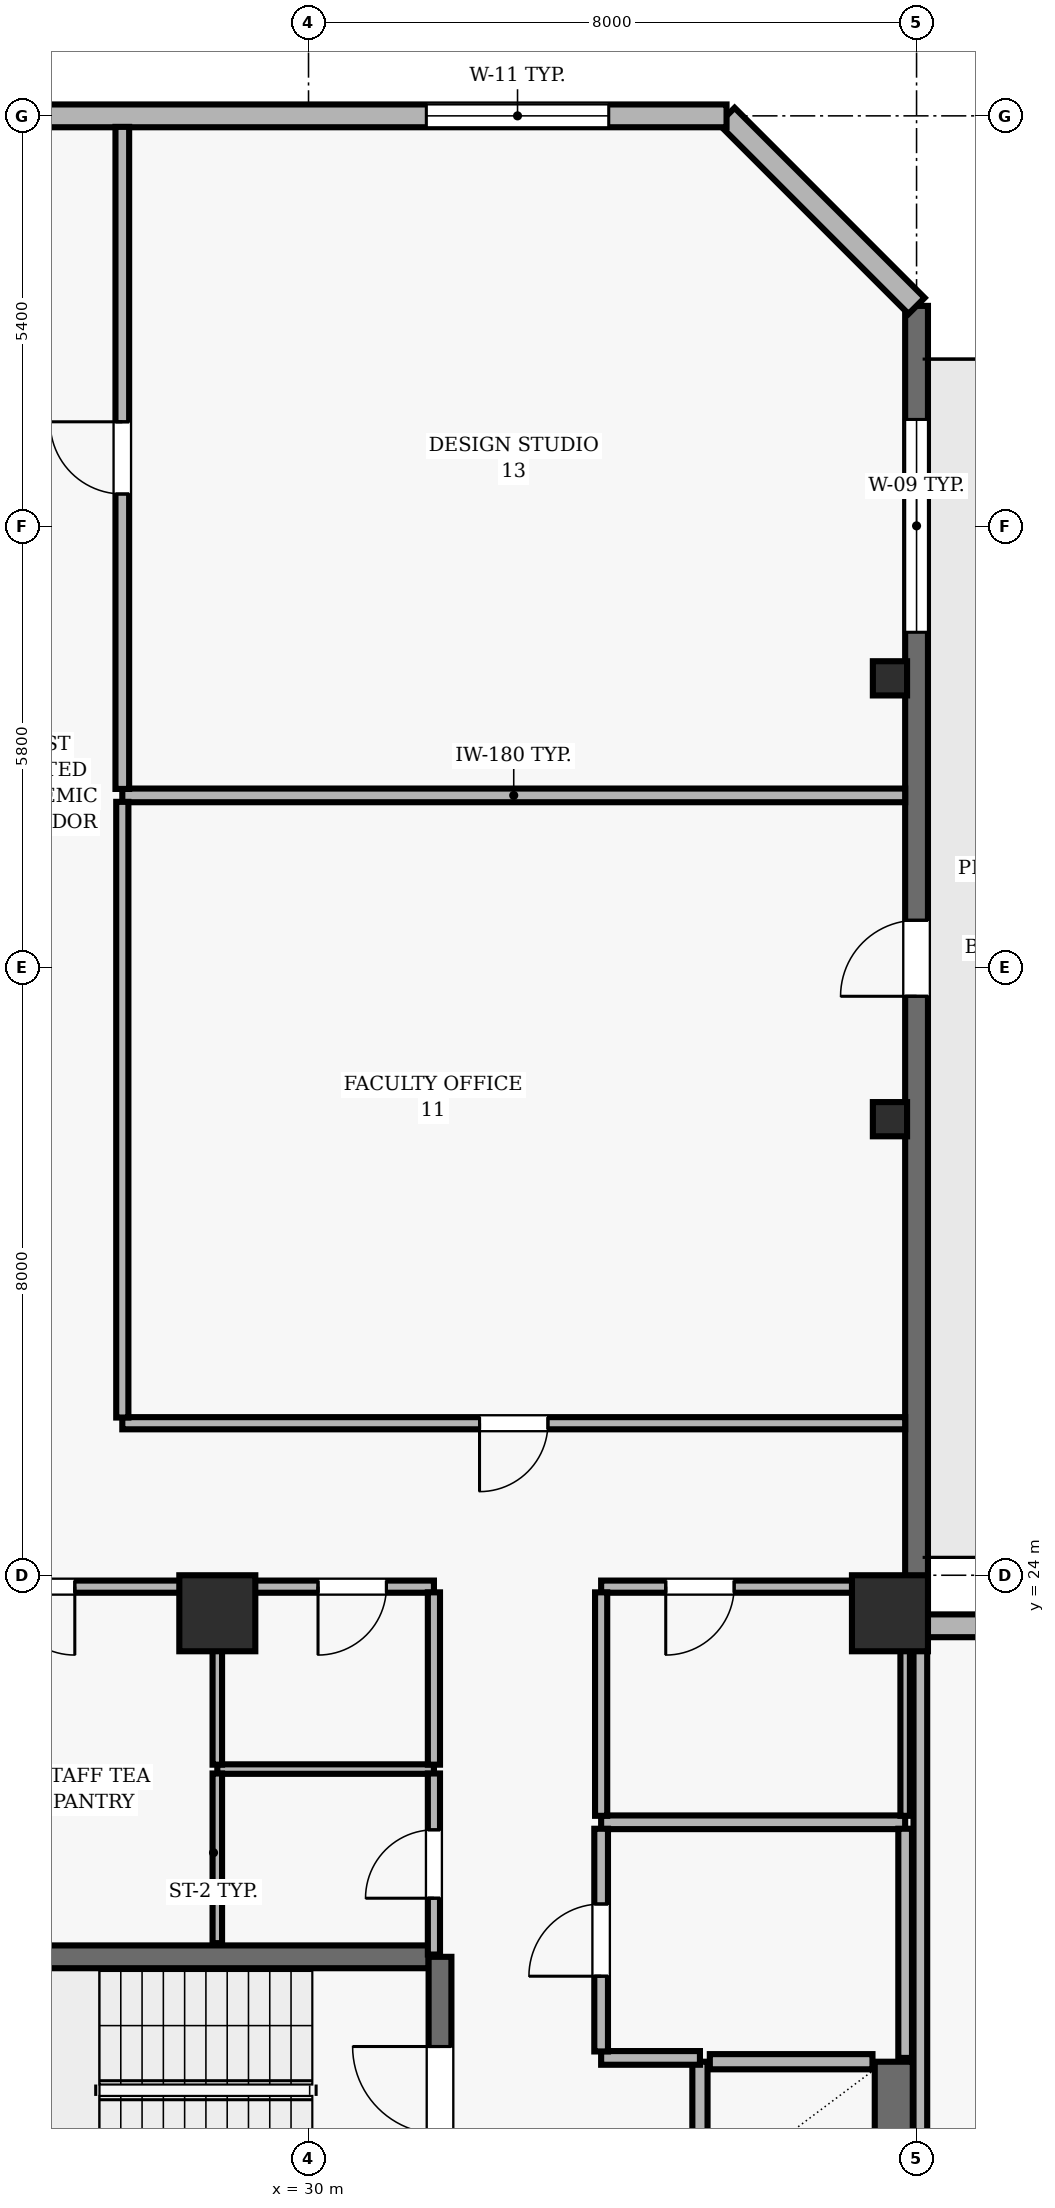
"""IFC4 building model, lengths in metres.
Left out: names, types, materials, properties, quantities, classifications, styles, units other than length and angle.
Written with IfcOpenShell. Run it as: python <this file> out.ifc"""

import sys

from ifc_helpers import new_model, si_unit, direction, frame, frame_2d, origin, origin_2d, place, context, subcontext, project, spatial, rectangle, hollow_rectangle, extrude, element, fill, save


model = new_model("IFC4")
c1 = context("Model", 3, precision=1e-05, world=origin(), true_north=direction((0.0, 1.0)))
c2 = subcontext(c1, "Body", "Model", "MODEL_VIEW")
j1 = project(units=[si_unit("LENGTHUNIT", "METRE"), si_unit("PLANEANGLEUNIT", "RADIAN")], contexts=[c1])
p1 = place(None, origin())
s1 = spatial("IfcSite", under=j1, at=p1, CompositionType="ELEMENT")
p2 = place(p1, origin())
s2 = spatial("IfcBuilding", under=s1, at=p2, CompositionType="ELEMENT")
p3 = place(p2, frame((0.0, 0.0, 199.2)))
s3 = spatial("IfcBuildingStorey", under=s2, at=p3, CompositionType="ELEMENT", Elevation=199.2)
for number, where, z_axis, x_axis in (
    (1, (28.8, 23.5, 0.0), (0.0, 0.0, 1.0), (1.0, 0.0, 0.0)),
    (2, (37.65, 23.5, 0.0), (0.0, 0.0, 1.0), (1.0, 0.0, 0.0)),
):
    element("IfcColumn", number, at=place(p3, frame(where, z_axis=z_axis, x_axis=x_axis)), inside=s3, PredefinedType="COLUMN", context=c2, shape_type="SweptSolid", body=[
        extrude(rectangle(XDim=1.0, YDim=1.0, at=origin_2d()), origin(), (0.0, 0.0, 1.0), 3.9),
    ])
for number, where, z_axis, x_axis in (
    (3, (37.65, 30.0, 0.0), (0.0, 0.0, 1.0), (1.0, 0.0, 0.0)),
    (4, (37.65, 35.8, 0.0), (0.0, 0.0, 1.0), (1.0, 0.0, 0.0)),
):
    element("IfcColumn", number, at=place(p3, frame(where, z_axis=z_axis, x_axis=x_axis)), inside=s3, PredefinedType="COLUMN", context=c2, shape_type="SweptSolid", body=[
        extrude(hollow_rectangle(XDim=0.45, YDim=0.45, WallThickness=0.02, at=origin_2d()), origin(), (0.0, 0.0, 1.0), 3.9),
    ])
p4 = place(p3, frame((45.9, 23.335, 0.0), z_axis=(0.0, 0.0, 1.0), x_axis=(-1.0, 0.0, 0.0)))
e5 = element("IfcWall", 5, at=p4, inside=s3, PredefinedType="SOLIDWALL", context=c2, shape_type="SweptSolid", body=[
    extrude(rectangle(XDim=7.9, YDim=0.3, at=frame_2d((3.95, 0.0))), origin(), (0.0, 0.0, 1.0), 3.69),
])
p5 = place(p4, frame((2.75, 0.0, 0.9)))
e6 = element("IfcOpeningElement", 6, at=p5, cuts=e5, PredefinedType="OPENING", context=c2, shape_type="SweptSolid", body=[
    extrude(rectangle(XDim=2.4, YDim=1.8, at=frame_2d((1.2, 0.9))), frame((0.0, 0.16, 0.0), z_axis=(0.0, -1.0, 0.0), x_axis=(1.0, 0.0, 0.0)), (0.0, 0.0, 1.0), 0.32),
])
p6 = place(p3, frame((38.0, 23.335, 0.0), z_axis=(0.0, 0.0, 1.0), x_axis=(0.0, 1.0, 0.0)))
e7 = element("IfcWall", 7, at=p6, inside=s3, PredefinedType="SOLIDWALL", context=c2, shape_type="SweptSolid", body=[
    extrude(rectangle(XDim=17.365, YDim=0.3, at=frame_2d((8.683, 0.0))), origin(), (0.0, 0.0, 1.0), 3.69),
])
p7 = place(p6, frame((8.282, 0.0, 0.0)))
e8 = element("IfcOpeningElement", 8, at=p7, cuts=e7, PredefinedType="OPENING", context=c2, shape_type="SweptSolid", body=[
    extrude(rectangle(XDim=1.0, YDim=2.2, at=frame_2d((0.5, 1.1))), frame((0.0, 0.16, 0.0), z_axis=(0.0, -1.0, 0.0), x_axis=(1.0, 0.0, 0.0)), (0.0, 0.0, 1.0), 0.32),
])
p8 = place(p6, frame((13.071, 0.0, 0.9)))
e9 = element("IfcOpeningElement", 9, at=p8, cuts=e7, PredefinedType="OPENING", context=c2, shape_type="SweptSolid", body=[
    extrude(rectangle(XDim=2.8, YDim=1.8, at=frame_2d((1.4, 0.9))), frame((0.0, 0.16, 0.0), z_axis=(0.0, -1.0, 0.0), x_axis=(1.0, 0.0, 0.0)), (0.0, 0.0, 1.0), 0.32),
])
p9 = place(p3, frame((38.0, 40.7, 0.0), z_axis=(0.0, 0.0, 1.0), x_axis=(-0.707106781187, 0.707106781187, 0.0)))
e10 = element("IfcWall", 10, at=p9, inside=s3, PredefinedType="SOLIDWALL", context=c2, shape_type="SweptSolid", body=[
    extrude(rectangle(XDim=3.536, YDim=0.3, at=frame_2d((1.768, 0.0))), origin(), (0.0, 0.0, 1.0), 3.69),
])
p10 = place(p3, frame((35.5, 43.2, 0.0), z_axis=(0.0, 0.0, 1.0), x_axis=(-1.0, 0.0, 0.0)))
e11 = element("IfcWall", 11, at=p10, inside=s3, PredefinedType="SOLIDWALL", context=c2, shape_type="SweptSolid", body=[
    extrude(rectangle(XDim=11.0, YDim=0.3, at=frame_2d((5.5, 0.0))), origin(), (0.0, 0.0, 1.0), 3.69),
])
p11 = place(p10, frame((1.55, 0.0, 0.9)))
e12 = element("IfcOpeningElement", 12, at=p11, cuts=e11, PredefinedType="OPENING", context=c2, shape_type="SweptSolid", body=[
    extrude(rectangle(XDim=2.4, YDim=2.2, at=frame_2d((1.2, 1.1))), frame((0.0, 0.16, 0.0), z_axis=(0.0, -1.0, 0.0), x_axis=(1.0, 0.0, 0.0)), (0.0, 0.0, 1.0), 0.32),
])
p12 = place(p3, frame((31.58, 18.98, 0.0), z_axis=(0.0, 0.0, 1.0), x_axis=(-1.0, 0.0, 0.0)))
e13 = element("IfcWall", 13, at=p12, inside=s3, PredefinedType="SHEAR", context=c2, shape_type="SweptSolid", body=[
    extrude(rectangle(XDim=8.36, YDim=0.3, at=frame_2d((4.18, 0.0))), origin(), (0.0, 0.0, 1.0), 3.69),
])
p13 = place(p3, frame((31.73, 15.47, 0.0), z_axis=(0.0, 0.0, 1.0), x_axis=(0.0, 1.0, 0.0)))
e14 = element("IfcWall", 14, at=p13, inside=s3, PredefinedType="SHEAR", context=c2, shape_type="SweptSolid", body=[
    extrude(rectangle(XDim=3.51, YDim=0.3, at=frame_2d((1.755, 0.0))), origin(), (0.0, 0.0, 1.0), 3.69),
])
p14 = place(p13, frame((1.18, 0.0, 0.0)))
e15 = element("IfcOpeningElement", 15, at=p14, cuts=e14, PredefinedType="OPENING", context=c2, shape_type="SweptSolid", body=[
    extrude(rectangle(XDim=1.15, YDim=2.15, at=frame_2d((0.575, 1.075))), frame((0.0, 0.16, 0.0), z_axis=(0.0, -1.0, 0.0), x_axis=(1.0, 0.0, 0.0)), (0.0, 0.0, 1.0), 0.32),
])
p15 = place(p3, frame((35.15, 17.6, 0.0), z_axis=(0.0, 0.0, 1.0), x_axis=(0.0, -1.0, 0.0)))
e16 = element("IfcWall", 16, at=p15, inside=s3, PredefinedType="SOLIDWALL", context=c2, shape_type="SweptSolid", body=[
    extrude(rectangle(XDim=1.85, YDim=0.2, at=frame_2d((0.925, 0.0))), origin(), (0.0, 0.0, 1.0), 3.69),
])
p16 = place(p3, frame((37.7, 15.75, 0.0), z_axis=(0.0, 0.0, 1.0), x_axis=(0.0, 1.0, 0.0)))
e17 = element("IfcWall", 17, at=p16, inside=s3, PredefinedType="SHEAR", context=c2, shape_type="SweptSolid", body=[
    extrude(rectangle(XDim=1.85, YDim=0.5, at=frame_2d((0.925, 0.0))), origin(), (0.0, 0.0, 1.0), 3.69),
])
p17 = place(p3, frame((37.42, 17.6, 0.0), z_axis=(0.0, 0.0, 1.0), x_axis=(-1.0, 0.0, 0.0)))
e18 = element("IfcWall", 18, at=p17, inside=s3, PredefinedType="SOLIDWALL", context=c2, shape_type="SweptSolid", body=[
    extrude(rectangle(XDim=2.14, YDim=0.2, at=frame_2d((1.07, 0.0))), origin(), (0.0, 0.0, 1.0), 3.69),
])
p18 = place(p3, frame((28.8, 23.85, 0.0), z_axis=(0.0, 0.0, 1.0), x_axis=(-1.0, 0.0, 0.0)))
e19 = element("IfcWall", 19, at=p18, inside=s3, PredefinedType="PARTITIONING", context=c2, shape_type="SweptSolid", body=[
    extrude(rectangle(XDim=3.25, YDim=0.16, at=frame_2d((1.625, 0.0))), origin(), (0.0, 0.0, 1.0), 3.139),
])
p19 = place(p18, frame((1.875, 0.0, 0.0)))
e20 = element("IfcOpeningElement", 20, at=p19, cuts=e19, PredefinedType="OPENING", context=c2, shape_type="SweptSolid", body=[
    extrude(rectangle(XDim=0.9, YDim=2.1, at=frame_2d((0.45, 1.05))), frame((0.0, 0.09, 0.0), z_axis=(0.0, -1.0, 0.0), x_axis=(1.0, 0.0, 0.0)), (0.0, 0.0, 1.0), 0.18),
])
p20 = place(p3, frame((31.65, 21.45, 0.0), z_axis=(0.0, 0.0, 1.0), x_axis=(-1.0, 0.0, 0.0)))
e21 = element("IfcWall", 21, at=p20, inside=s3, PredefinedType="PARTITIONING", context=c2, shape_type="SweptSolid", body=[
    extrude(rectangle(XDim=2.85, YDim=0.125, at=frame_2d((1.425, 0.0))), origin(), (0.0, 0.0, 1.0), 3.69),
])
p21 = place(p3, frame((31.65, 23.85, 0.0), z_axis=(0.0, 0.0, 1.0), x_axis=(-1.0, 0.0, 0.0)))
e22 = element("IfcWall", 22, at=p21, inside=s3, PredefinedType="PARTITIONING", context=c2, shape_type="SweptSolid", body=[
    extrude(rectangle(XDim=2.85, YDim=0.16, at=frame_2d((1.425, 0.0))), origin(), (0.0, 0.0, 1.0), 3.139),
])
p22 = place(p21, frame((0.625, 0.0, 0.0)))
e23 = element("IfcOpeningElement", 23, at=p22, cuts=e22, PredefinedType="OPENING", context=c2, shape_type="SweptSolid", body=[
    extrude(rectangle(XDim=0.9, YDim=2.1, at=frame_2d((0.45, 1.05))), frame((0.0, 0.09, 0.0), z_axis=(0.0, -1.0, 0.0), x_axis=(1.0, 0.0, 0.0)), (0.0, 0.0, 1.0), 0.18),
])
p23 = place(p3, frame((33.85, 17.65, 0.0), z_axis=(0.0, 0.0, 1.0), x_axis=(1.0, 0.0, 0.0)))
e24 = element("IfcWall", 24, at=p23, inside=s3, PredefinedType="PARTITIONING", context=c2, shape_type="SweptSolid", body=[
    extrude(rectangle(XDim=1.3, YDim=0.18, at=frame_2d((0.65, 0.0))), origin(), (0.0, 0.0, 1.0), 3.69),
])
p24 = place(p3, frame((37.85, 20.75, 0.0), z_axis=(0.0, 0.0, 1.0), x_axis=(-1.0, 0.0, 0.0)))
e25 = element("IfcWall", 25, at=p24, inside=s3, PredefinedType="PARTITIONING", context=c2, shape_type="SweptSolid", body=[
    extrude(rectangle(XDim=4.0, YDim=0.18, at=frame_2d((2.0, 0.0))), origin(), (0.0, 0.0, 1.0), 3.69),
])
p25 = place(p3, frame((37.85, 23.85, 0.0), z_axis=(0.0, 0.0, 1.0), x_axis=(-1.0, 0.0, 0.0)))
e26 = element("IfcWall", 26, at=p25, inside=s3, PredefinedType="PARTITIONING", context=c2, shape_type="SweptSolid", body=[
    extrude(rectangle(XDim=4.0, YDim=0.16, at=frame_2d((2.0, 0.0))), origin(), (0.0, 0.0, 1.0), 3.139),
])
p26 = place(p25, frame((2.25, 0.0, 0.0)))
e27 = element("IfcOpeningElement", 27, at=p26, cuts=e26, PredefinedType="OPENING", context=c2, shape_type="SweptSolid", body=[
    extrude(rectangle(XDim=0.9, YDim=2.1, at=frame_2d((0.45, 1.05))), frame((0.0, 0.09, 0.0), z_axis=(0.0, -1.0, 0.0), x_axis=(1.0, 0.0, 0.0)), (0.0, 0.0, 1.0), 0.18),
])
p27 = place(p3, frame((37.85, 26.0, 0.0), z_axis=(0.0, 0.0, 1.0), x_axis=(-1.0, 0.0, 0.0)))
e28 = element("IfcWall", 28, at=p27, inside=s3, PredefinedType="PARTITIONING", context=c2, shape_type="SweptSolid", body=[
    extrude(rectangle(XDim=10.3, YDim=0.16, at=frame_2d((5.15, 0.0))), origin(), (0.0, 0.0, 1.0), 3.69),
])
p28 = place(p27, frame((4.7, 0.0, 0.0)))
e29 = element("IfcOpeningElement", 29, at=p28, cuts=e28, PredefinedType="OPENING", context=c2, shape_type="SweptSolid", body=[
    extrude(rectangle(XDim=0.9, YDim=2.1, at=frame_2d((0.45, 1.05))), frame((0.0, 0.09, 0.0), z_axis=(0.0, -1.0, 0.0), x_axis=(1.0, 0.0, 0.0)), (0.0, 0.0, 1.0), 0.18),
])
p29 = place(p3, frame((37.85, 34.26, 0.0), z_axis=(0.0, 0.0, 1.0), x_axis=(-1.0, 0.0, 0.0)))
e30 = element("IfcWall", 30, at=p29, inside=s3, PredefinedType="PARTITIONING", context=c2, shape_type="SweptSolid", body=[
    extrude(rectangle(XDim=10.3, YDim=0.18, at=frame_2d((5.15, 0.0))), origin(), (0.0, 0.0, 1.0), 3.69),
])
p30 = place(p3, frame((27.55, 26.075, 0.0), z_axis=(0.0, 0.0, 1.0), x_axis=(0.0, 1.0, 0.0)))
e31 = element("IfcWall", 31, at=p30, inside=s3, PredefinedType="PARTITIONING", context=c2, shape_type="SweptSolid", body=[
    extrude(rectangle(XDim=8.1, YDim=0.16, at=frame_2d((4.05, 0.0))), origin(), (0.0, 0.0, 1.0), 3.69),
])
p31 = place(p3, frame((27.55, 34.345, 0.0), z_axis=(0.0, 0.0, 1.0), x_axis=(0.0, 1.0, 0.0)))
e32 = element("IfcWall", 32, at=p31, inside=s3, PredefinedType="PARTITIONING", context=c2, shape_type="SweptSolid", body=[
    extrude(rectangle(XDim=8.71, YDim=0.18, at=frame_2d((4.355, 0.0))), origin(), (0.0, 0.0, 1.0), 3.69),
])
p32 = place(p31, frame((3.88, 0.0, 0.0)))
e33 = element("IfcOpeningElement", 33, at=p32, cuts=e32, PredefinedType="OPENING", context=c2, shape_type="SweptSolid", body=[
    extrude(rectangle(XDim=0.95, YDim=2.1, at=frame_2d((0.475, 1.05))), frame((0.0, 0.1, 0.0), z_axis=(0.0, -1.0, 0.0), x_axis=(1.0, 0.0, 0.0)), (0.0, 0.0, 1.0), 0.2),
])
p33 = place(p3, frame((28.8, 21.392, 0.0), z_axis=(0.0, 0.0, 1.0), x_axis=(0.0, -1.0, 0.0)))
e34 = element("IfcWall", 34, at=p33, inside=s3, PredefinedType="PARTITIONING", context=c2, shape_type="SweptSolid", body=[
    extrude(rectangle(XDim=2.232, YDim=0.125, at=frame_2d((1.116, 0.0))), origin(), (0.0, 0.0, 1.0), 3.69),
])
p34 = place(p3, frame((28.8, 23.775, 0.0), z_axis=(0.0, 0.0, 1.0), x_axis=(0.0, -1.0, 0.0)))
e35 = element("IfcWall", 35, at=p34, inside=s3, PredefinedType="PARTITIONING", context=c2, shape_type="SweptSolid", body=[
    extrude(rectangle(XDim=2.267, YDim=0.125, at=frame_2d((1.133, 0.0))), origin(), (0.0, 0.0, 1.0), 3.69),
])
p35 = place(p3, frame((31.65, 19.01, 0.0), z_axis=(0.0, 0.0, 1.0), x_axis=(0.0, 1.0, 0.0)))
e36 = element("IfcWall", 36, at=p35, inside=s3, PredefinedType="PARTITIONING", context=c2, shape_type="SweptSolid", body=[
    extrude(rectangle(XDim=2.382, YDim=0.16, at=frame_2d((1.191, 0.0))), origin(), (0.0, 0.0, 1.0), 3.69),
])
p36 = place(p35, frame((0.741, 0.0, 0.0)))
e37 = element("IfcOpeningElement", 37, at=p36, cuts=e36, PredefinedType="OPENING", context=c2, shape_type="SweptSolid", body=[
    extrude(rectangle(XDim=0.9, YDim=2.1, at=frame_2d((0.45, 1.05))), frame((0.0, 0.09, 0.0), z_axis=(0.0, -1.0, 0.0), x_axis=(1.0, 0.0, 0.0)), (0.0, 0.0, 1.0), 0.18),
])
p37 = place(p3, frame((31.65, 23.775, 0.0), z_axis=(0.0, 0.0, 1.0), x_axis=(0.0, -1.0, 0.0)))
e38 = element("IfcWall", 38, at=p37, inside=s3, PredefinedType="PARTITIONING", context=c2, shape_type="SweptSolid", body=[
    extrude(rectangle(XDim=2.267, YDim=0.16, at=frame_2d((1.133, 0.0))), origin(), (0.0, 0.0, 1.0), 3.69),
])
p38 = place(p3, frame((33.85, 17.735, 0.0), z_axis=(0.0, 0.0, 1.0), x_axis=(0.0, 1.0, 0.0)))
e39 = element("IfcWall", 39, at=p38, inside=s3, PredefinedType="PARTITIONING", context=c2, shape_type="SweptSolid", body=[
    extrude(rectangle(XDim=2.93, YDim=0.18, at=frame_2d((1.465, 0.0))), origin(), (0.0, 0.0, 1.0), 3.69),
])
p39 = place(p38, frame((0.99, 0.0, 0.0)))
e40 = element("IfcOpeningElement", 40, at=p39, cuts=e39, PredefinedType="OPENING", context=c2, shape_type="SweptSolid", body=[
    extrude(rectangle(XDim=0.95, YDim=2.1, at=frame_2d((0.475, 1.05))), frame((0.0, 0.1, 0.0), z_axis=(0.0, -1.0, 0.0), x_axis=(1.0, 0.0, 0.0)), (0.0, 0.0, 1.0), 0.2),
])
p40 = place(p3, frame((33.85, 20.835, 0.0), z_axis=(0.0, 0.0, 1.0), x_axis=(0.0, 1.0, 0.0)))
e41 = element("IfcWall", 41, at=p40, inside=s3, PredefinedType="PARTITIONING", context=c2, shape_type="SweptSolid", body=[
    extrude(rectangle(XDim=2.94, YDim=0.16, at=frame_2d((1.47, 0.0))), origin(), (0.0, 0.0, 1.0), 3.69),
])
p41 = place(p3, frame((37.85, 17.65, 0.0), z_axis=(0.0, 0.0, 1.0), x_axis=(0.0, 1.0, 0.0)))
e42 = element("IfcWall", 42, at=p41, inside=s3, PredefinedType="PARTITIONING", context=c2, shape_type="SweptSolid", body=[
    extrude(rectangle(XDim=3.015, YDim=0.18, at=frame_2d((1.508, 0.0))), origin(), (0.0, 0.0, 1.0), 3.139),
])
p42 = place(p3, frame((37.85, 20.835, 0.0), z_axis=(0.0, 0.0, 1.0), x_axis=(0.0, 1.0, 0.0)))
e43 = element("IfcWall", 43, at=p42, inside=s3, PredefinedType="PARTITIONING", context=c2, shape_type="SweptSolid", body=[
    extrude(rectangle(XDim=2.5, YDim=0.125, at=frame_2d((1.25, 0.0))), origin(), (0.0, 0.0, 1.0), 3.139),
])
p43 = place(p3, frame((38.05, 23.19, 0.0), z_axis=(0.0, 0.0, 1.0), x_axis=(0.0, -1.0, 0.0)))
e44 = element("IfcWall", 44, at=p43, inside=s3, PredefinedType="PARTITIONING", context=c2, shape_type="SweptSolid", body=[
    extrude(rectangle(XDim=7.115, YDim=0.18, at=frame_2d((3.558, 0.0))), origin(), (0.0, 0.0, 1.0), 3.139),
])
p44 = place(p7, origin())
e45 = element("IfcDoor", 45, at=p44, inside=s3, OperationType="SINGLE_SWING_LEFT", PredefinedType="DOOR", context=c2, shape_type="SweptSolid", body=[
    extrude(rectangle(XDim=1.0, YDim=2.2, at=frame_2d((0.5, 1.1))), frame((0.0, 0.025, 0.0), z_axis=(0.0, -1.0, 0.0), x_axis=(1.0, 0.0, 0.0)), (0.0, 0.0, 1.0), 0.05),
])
fill(e8, e45)
p45 = place(p8, origin())
e46 = element("IfcWindow", 46, at=p45, inside=s3, PartitioningType="SINGLE_PANEL", PredefinedType="WINDOW", context=c2, shape_type="SweptSolid", body=[
    extrude(rectangle(XDim=2.8, YDim=1.8, at=frame_2d((1.4, 0.9))), frame((0.0, 0.03, 0.0), z_axis=(0.0, -1.0, 0.0), x_axis=(1.0, 0.0, 0.0)), (0.0, 0.0, 1.0), 0.06),
])
fill(e9, e46)
p46 = place(p11, origin())
e47 = element("IfcWindow", 47, at=p46, inside=s3, PartitioningType="SINGLE_PANEL", PredefinedType="WINDOW", context=c2, shape_type="SweptSolid", body=[
    extrude(rectangle(XDim=2.4, YDim=2.2, at=frame_2d((1.2, 1.1))), frame((0.0, 0.03, 0.0), z_axis=(0.0, -1.0, 0.0), x_axis=(1.0, 0.0, 0.0)), (0.0, 0.0, 1.0), 0.06),
])
fill(e12, e47)
p47 = place(p14, origin())
e48 = element("IfcDoor", 48, at=p47, inside=s3, OperationType="SINGLE_SWING_RIGHT", PredefinedType="DOOR", context=c2, shape_type="SweptSolid", body=[
    extrude(rectangle(XDim=1.15, YDim=2.15, at=frame_2d((0.575, 1.075))), frame((0.0, 0.025, 0.0), z_axis=(0.0, -1.0, 0.0), x_axis=(1.0, 0.0, 0.0)), (0.0, 0.0, 1.0), 0.05),
])
fill(e15, e48)
p48 = place(p39, origin())
e49 = element("IfcDoor", 49, at=p48, inside=s3, OperationType="SINGLE_SWING_LEFT", PredefinedType="DOOR", context=c2, shape_type="SweptSolid", body=[
    extrude(rectangle(XDim=0.95, YDim=2.1, at=frame_2d((0.475, 1.05))), frame((0.0, 0.025, 0.0), z_axis=(0.0, -1.0, 0.0), x_axis=(1.0, 0.0, 0.0)), (0.0, 0.0, 1.0), 0.05),
])
fill(e40, e49)
p49 = place(p26, origin())
e50 = element("IfcDoor", 50, at=p49, inside=s3, OperationType="SINGLE_SWING_RIGHT", PredefinedType="DOOR", context=c2, shape_type="SweptSolid", body=[
    extrude(rectangle(XDim=0.9, YDim=2.1, at=frame_2d((0.45, 1.05))), frame((0.0, 0.025, 0.0), z_axis=(0.0, -1.0, 0.0), x_axis=(1.0, 0.0, 0.0)), (0.0, 0.0, 1.0), 0.05),
])
fill(e27, e50)
p50 = place(p36, origin())
e51 = element("IfcDoor", 51, at=p50, inside=s3, OperationType="SINGLE_SWING_LEFT", PredefinedType="DOOR", context=c2, shape_type="SweptSolid", body=[
    extrude(rectangle(XDim=0.9, YDim=2.1, at=frame_2d((0.45, 1.05))), frame((0.0, 0.025, 0.0), z_axis=(0.0, -1.0, 0.0), x_axis=(1.0, 0.0, 0.0)), (0.0, 0.0, 1.0), 0.05),
])
fill(e37, e51)
p51 = place(p22, origin())
e52 = element("IfcDoor", 52, at=p51, inside=s3, OperationType="SINGLE_SWING_RIGHT", PredefinedType="DOOR", context=c2, shape_type="SweptSolid", body=[
    extrude(rectangle(XDim=0.9, YDim=2.1, at=frame_2d((0.45, 1.05))), frame((0.0, 0.025, 0.0), z_axis=(0.0, -1.0, 0.0), x_axis=(1.0, 0.0, 0.0)), (0.0, 0.0, 1.0), 0.05),
])
fill(e23, e52)
p52 = place(p19, origin())
e53 = element("IfcDoor", 53, at=p52, inside=s3, OperationType="SINGLE_SWING_LEFT", PredefinedType="DOOR", context=c2, shape_type="SweptSolid", body=[
    extrude(rectangle(XDim=0.9, YDim=2.1, at=frame_2d((0.45, 1.05))), frame((0.0, 0.025, 0.0), z_axis=(0.0, -1.0, 0.0), x_axis=(1.0, 0.0, 0.0)), (0.0, 0.0, 1.0), 0.05),
])
fill(e20, e53)
p53 = place(p28, origin())
e54 = element("IfcDoor", 54, at=p53, inside=s3, OperationType="SINGLE_SWING_RIGHT", PredefinedType="DOOR", context=c2, shape_type="SweptSolid", body=[
    extrude(rectangle(XDim=0.9, YDim=2.1, at=frame_2d((0.45, 1.05))), frame((0.0, 0.025, 0.0), z_axis=(0.0, -1.0, 0.0), x_axis=(1.0, 0.0, 0.0)), (0.0, 0.0, 1.0), 0.05),
])
fill(e29, e54)
p54 = place(p32, origin())
e55 = element("IfcDoor", 55, at=p54, inside=s3, OperationType="SINGLE_SWING_RIGHT", PredefinedType="DOOR", context=c2, shape_type="SweptSolid", body=[
    extrude(rectangle(XDim=0.95, YDim=2.1, at=frame_2d((0.475, 1.05))), frame((0.0, 0.025, 0.0), z_axis=(0.0, -1.0, 0.0), x_axis=(1.0, 0.0, 0.0)), (0.0, 0.0, 1.0), 0.05),
])
fill(e33, e55)
save(model, sys.argv[1])
